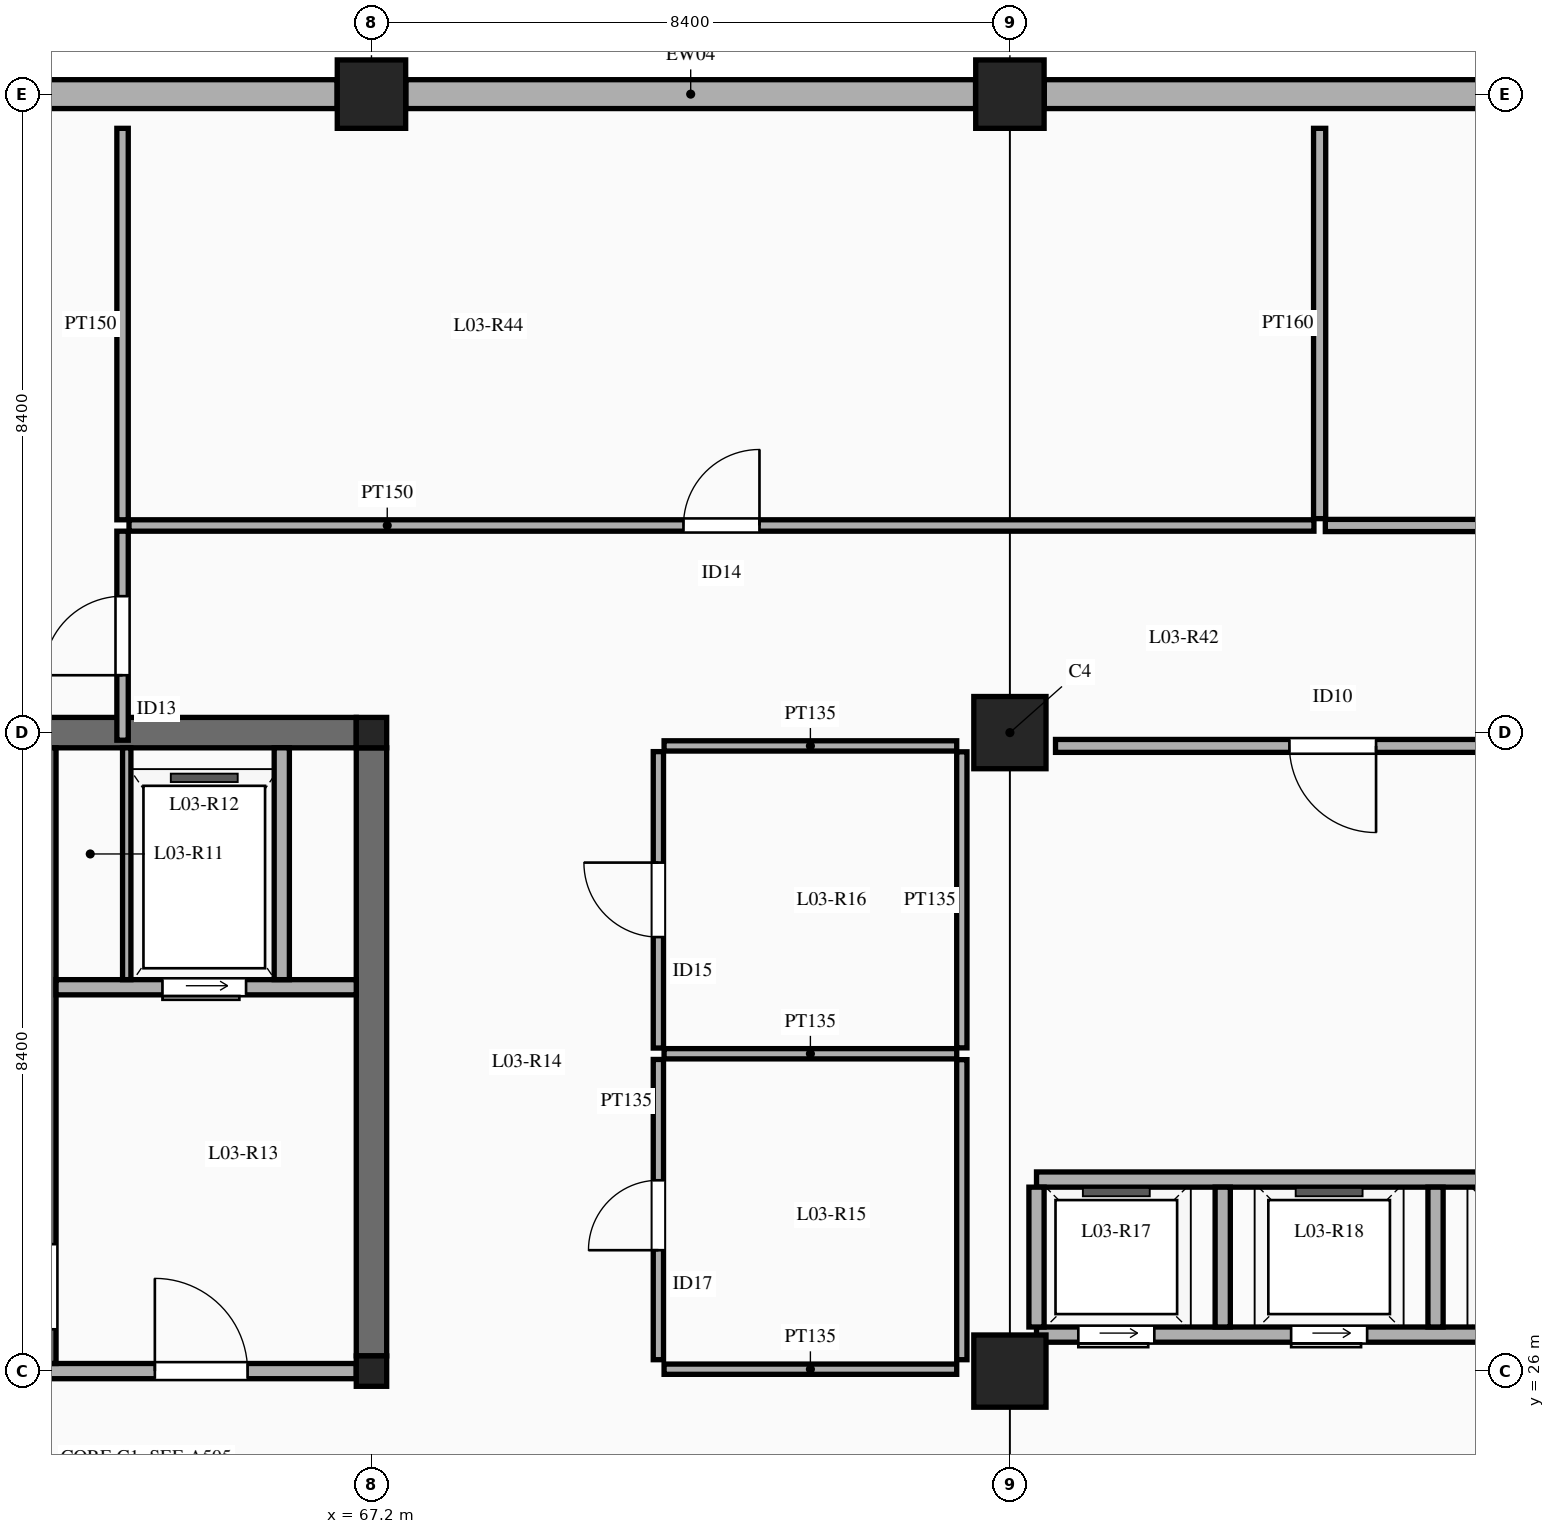
"""IFC4 building model, lengths in metres.
Left out: names, types, materials, properties, quantities, classifications, styles, units other than length and angle.
Written with IfcOpenShell. Run it as: python <this file> out.ifc"""

import sys

from ifc_helpers import new_model, si_unit, direction, frame, frame_2d, origin, origin_2d, place, context, subcontext, project, spatial, rectangle, extrude, element, fill, save


model = new_model("IFC4")
c1 = context("Model", 3, precision=1e-05, world=origin(), true_north=direction((0.0, 1.0)))
c2 = subcontext(c1, "Body", "Model", "MODEL_VIEW")
j1 = project(units=[si_unit("LENGTHUNIT", "METRE"), si_unit("PLANEANGLEUNIT", "RADIAN")], contexts=[c1])
p1 = place(None, origin())
s1 = spatial("IfcSite", under=j1, at=p1, CompositionType="ELEMENT")
p2 = place(p1, origin())
s2 = spatial("IfcBuilding", under=s1, at=p2, CompositionType="ELEMENT")
p3 = place(p2, frame((0.0, 0.0, 15.0)))
s3 = spatial("IfcBuildingStorey", under=s2, at=p3, CompositionType="ELEMENT", Elevation=15.0)
for number, where, z_axis, x_axis in (
    (1, (67.2, 26.0, 0.0), (0.0, 0.0, 1.0), (1.0, 0.0, 0.0)),
    (2, (67.2, 34.4, 0.0), (0.0, 0.0, 1.0), (1.0, 0.0, 0.0)),
):
    element("IfcColumn", number, at=place(p3, frame(where, z_axis=z_axis, x_axis=x_axis)), inside=s3, PredefinedType="COLUMN", context=c2, shape_type="SweptSolid", body=[
        extrude(rectangle(XDim=0.4, YDim=0.4, at=origin_2d()), origin(), (0.0, 0.0, 1.0), 4.5),
    ])
p4 = place(p3, frame((67.2, 42.8, 0.0), z_axis=(0.0, 0.0, 1.0), x_axis=(1.0, 0.0, 0.0)))
e3 = element("IfcColumn", 3, at=p4, inside=s3, PredefinedType="COLUMN", context=c2, shape_type="SweptSolid", body=[
    extrude(rectangle(XDim=0.9, YDim=0.9, at=origin_2d()), origin(), (0.0, 0.0, 1.0), 4.5),
])
for number, where, z_axis, x_axis in (
    (4, (75.6, 26.0, 0.0), (0.0, 0.0, 1.0), (1.0, 0.0, 0.0)),
    (5, (75.6, 34.4, 0.0), (0.0, 0.0, 1.0), (1.0, 0.0, 0.0)),
):
    element("IfcColumn", number, at=place(p3, frame(where, z_axis=z_axis, x_axis=x_axis)), inside=s3, PredefinedType="COLUMN", context=c2, shape_type="SweptSolid", body=[
        extrude(rectangle(XDim=0.95, YDim=0.95, at=origin_2d()), origin(), (0.0, 0.0, 1.0), 4.5),
    ])
p5 = place(p3, frame((75.6, 42.8, 0.0), z_axis=(0.0, 0.0, 1.0), x_axis=(1.0, 0.0, 0.0)))
e6 = element("IfcColumn", 6, at=p5, inside=s3, PredefinedType="COLUMN", context=c2, shape_type="SweptSolid", body=[
    extrude(rectangle(XDim=0.9, YDim=0.9, at=origin_2d()), origin(), (0.0, 0.0, 1.0), 4.5),
])
for number, where, z_axis, x_axis in (
    (7, (67.2, 26.2, 0.0), (0.0, 0.0, 1.0), (0.0, 1.0, 0.0)),
    (8, (59.0, 34.4, 0.0), (0.0, 0.0, 1.0), (1.0, 0.0, 0.0)),
):
    element("IfcWall", number, at=place(p3, frame(where, z_axis=z_axis, x_axis=x_axis)), inside=s3, PredefinedType="SHEAR", context=c2, shape_type="SweptSolid", body=[
        extrude(rectangle(XDim=8.0, YDim=0.4, at=frame_2d((4.0, 0.0))), origin(), (0.0, 0.0, 1.0), 4.5),
    ])
p6 = place(p3, frame((59.252, 42.8, 0.0), z_axis=(0.0, 0.0, 1.0), x_axis=(1.0, 0.0, 0.0)))
e9 = element("IfcWall", 9, at=p6, inside=s3, PredefinedType="SOLIDWALL", context=c2, shape_type="SweptSolid", body=[
    extrude(rectangle(XDim=7.496, YDim=0.38, at=frame_2d((3.748, 0.0))), origin(), (0.0, 0.0, 1.0), 3.55),
])
p7 = place(p3, frame((67.652, 42.8, 0.0), z_axis=(0.0, 0.0, 1.0), x_axis=(1.0, 0.0, 0.0)))
e10 = element("IfcWall", 10, at=p7, inside=s3, PredefinedType="SOLIDWALL", context=c2, shape_type="SweptSolid", body=[
    extrude(rectangle(XDim=7.496, YDim=0.38, at=frame_2d((3.748, 0.0))), origin(), (0.0, 0.0, 1.0), 3.55),
])
p8 = place(p3, frame((76.052, 42.8, 0.0), z_axis=(0.0, 0.0, 1.0), x_axis=(1.0, 0.0, 0.0)))
e11 = element("IfcWall", 11, at=p8, inside=s3, PredefinedType="SOLIDWALL", context=c2, shape_type="SweptSolid", body=[
    extrude(rectangle(XDim=7.496, YDim=0.38, at=frame_2d((3.748, 0.0))), origin(), (0.0, 0.0, 1.0), 3.55),
])
p9 = place(p3, frame((59.0, 26.0, 0.0), z_axis=(0.0, 0.0, 1.0), x_axis=(1.0, 0.0, 0.0)))
e12 = element("IfcWall", 12, at=p9, inside=s3, PredefinedType="SOLIDWALL", context=c2, shape_type="SweptSolid", body=[
    extrude(rectangle(XDim=8.0, YDim=0.2, at=frame_2d((4.0, 0.0))), origin(), (0.0, 0.0, 1.0), 3.48),
])
p10 = place(p9, frame((1.55, 0.0, 0.0)))
e13 = element("IfcOpeningElement", 13, at=p10, cuts=e12, PredefinedType="OPENING", context=c2, shape_type="SweptSolid", body=[
    extrude(rectangle(XDim=1.15, YDim=2.15, at=frame_2d((0.575, 1.075))), frame((0.0, 0.11, 0.0), z_axis=(0.0, -1.0, 0.0), x_axis=(1.0, 0.0, 0.0)), (0.0, 0.0, 1.0), 0.22),
])
p11 = place(p9, frame((5.35, 0.0, 0.0)))
e14 = element("IfcOpeningElement", 14, at=p11, cuts=e12, PredefinedType="OPENING", context=c2, shape_type="SweptSolid", body=[
    extrude(rectangle(XDim=1.22, YDim=2.15, at=frame_2d((0.61, 1.075))), frame((0.0, 0.11, 0.0), z_axis=(0.0, -1.0, 0.0), x_axis=(1.0, 0.0, 0.0)), (0.0, 0.0, 1.0), 0.22),
])
p12 = place(p3, frame((62.95, 26.1, 0.0), z_axis=(0.0, 0.0, 1.0), x_axis=(0.0, 1.0, 0.0)))
e15 = element("IfcWall", 15, at=p12, inside=s3, PredefinedType="SOLIDWALL", context=c2, shape_type="SweptSolid", body=[
    extrude(rectangle(XDim=8.1, YDim=0.2, at=frame_2d((4.05, 0.0))), origin(), (0.0, 0.0, 1.0), 4.25),
])
p13 = place(p12, frame((0.45, 0.0, 0.0)))
e16 = element("IfcOpeningElement", 16, at=p13, cuts=e15, PredefinedType="OPENING", context=c2, shape_type="SweptSolid", body=[
    extrude(rectangle(XDim=1.12, YDim=2.15, at=frame_2d((0.56, 1.075))), frame((0.0, 0.11, 0.0), z_axis=(0.0, -1.0, 0.0), x_axis=(1.0, 0.0, 0.0)), (0.0, 0.0, 1.0), 0.22),
])
p14 = place(p3, frame((63.05, 31.05, 0.0), z_axis=(0.0, 0.0, 1.0), x_axis=(1.0, 0.0, 0.0)))
e17 = element("IfcWall", 17, at=p14, inside=s3, PredefinedType="SOLIDWALL", context=c2, shape_type="SweptSolid", body=[
    extrude(rectangle(XDim=3.95, YDim=0.2, at=frame_2d((1.975, 0.0))), origin(), (0.0, 0.0, 1.0), 4.25),
])
p15 = place(p14, frame((1.4, 0.0, 0.0)))
e18 = element("IfcOpeningElement", 18, at=p15, cuts=e17, PredefinedType="OPENING", context=c2, shape_type="SweptSolid", body=[
    extrude(rectangle(XDim=1.1, YDim=2.15, at=frame_2d((0.55, 1.075))), frame((0.0, 0.11, 0.0), z_axis=(0.0, -1.0, 0.0), x_axis=(1.0, 0.0, 0.0)), (0.0, 0.0, 1.0), 0.22),
])
p16 = place(p3, frame((63.98, 31.15, 0.0), z_axis=(0.0, 0.0, 1.0), x_axis=(0.0, 1.0, 0.0)))
e19 = element("IfcWall", 19, at=p16, inside=s3, PredefinedType="PARTITIONING", context=c2, shape_type="SweptSolid", body=[
    extrude(rectangle(XDim=3.05, YDim=0.11, at=frame_2d((1.525, 0.0))), origin(), (0.0, 0.0, 1.0), 4.25),
])
p17 = place(p3, frame((66.02, 31.15, 0.0), z_axis=(0.0, 0.0, 1.0), x_axis=(0.0, 1.0, 0.0)))
e20 = element("IfcWall", 20, at=p17, inside=s3, PredefinedType="SOLIDWALL", context=c2, shape_type="SweptSolid", body=[
    extrude(rectangle(XDim=3.05, YDim=0.2, at=frame_2d((1.525, 0.0))), origin(), (0.0, 0.0, 1.0), 4.25),
])
p18 = place(p3, frame((75.95, 26.48, 0.0), z_axis=(0.0, 0.0, 1.0), x_axis=(1.0, 0.0, 0.0)))
e21 = element("IfcWall", 21, at=p18, inside=s3, PredefinedType="SOLIDWALL", context=c2, shape_type="SweptSolid", body=[
    extrude(rectangle(XDim=7.77, YDim=0.2, at=frame_2d((3.885, 0.0))), origin(), (0.0, 0.0, 1.0), 3.48),
])
p19 = place(p18, frame((0.55, 0.0, 0.0)))
e22 = element("IfcOpeningElement", 22, at=p19, cuts=e21, PredefinedType="OPENING", context=c2, shape_type="SweptSolid", body=[
    extrude(rectangle(XDim=1.0, YDim=2.15, at=frame_2d((0.5, 1.075))), frame((0.0, 0.11, 0.0), z_axis=(0.0, -1.0, 0.0), x_axis=(1.0, 0.0, 0.0)), (0.0, 0.0, 1.0), 0.22),
])
p20 = place(p18, frame((3.35, 0.0, 0.0)))
e23 = element("IfcOpeningElement", 23, at=p20, cuts=e21, PredefinedType="OPENING", context=c2, shape_type="SweptSolid", body=[
    extrude(rectangle(XDim=1.0, YDim=2.15, at=frame_2d((0.5, 1.075))), frame((0.0, 0.11, 0.0), z_axis=(0.0, -1.0, 0.0), x_axis=(1.0, 0.0, 0.0)), (0.0, 0.0, 1.0), 0.22),
])
p21 = place(p18, frame((6.15, 0.0, 0.0)))
e24 = element("IfcOpeningElement", 24, at=p21, cuts=e21, PredefinedType="OPENING", context=c2, shape_type="SweptSolid", body=[
    extrude(rectangle(XDim=1.0, YDim=2.15, at=frame_2d((0.5, 1.075))), frame((0.0, 0.11, 0.0), z_axis=(0.0, -1.0, 0.0), x_axis=(1.0, 0.0, 0.0)), (0.0, 0.0, 1.0), 0.22),
])
p22 = place(p3, frame((75.95, 28.52, 0.0), z_axis=(0.0, 0.0, 1.0), x_axis=(1.0, 0.0, 0.0)))
e25 = element("IfcWall", 25, at=p22, inside=s3, PredefinedType="SOLIDWALL", context=c2, shape_type="SweptSolid", body=[
    extrude(rectangle(XDim=7.77, YDim=0.2, at=frame_2d((3.885, 0.0))), origin(), (0.0, 0.0, 1.0), 4.25),
])
p23 = place(p3, frame((75.95, 26.58, 0.0), z_axis=(0.0, 0.0, 1.0), x_axis=(0.0, 1.0, 0.0)))
e26 = element("IfcWall", 26, at=p23, inside=s3, PredefinedType="SOLIDWALL", context=c2, shape_type="SweptSolid", body=[
    extrude(rectangle(XDim=1.84, YDim=0.2, at=frame_2d((0.92, 0.0))), origin(), (0.0, 0.0, 1.0), 3.63),
])
for number, where, z_axis, x_axis in (
    (27, (78.4, 26.58, 0.0), (0.0, 0.0, 1.0), (0.0, 1.0, 0.0)),
    (28, (81.2, 26.58, 0.0), (0.0, 0.0, 1.0), (0.0, 1.0, 0.0)),
):
    element("IfcWall", number, at=place(p3, frame(where, z_axis=z_axis, x_axis=x_axis)), inside=s3, PredefinedType="SOLIDWALL", context=c2, shape_type="SweptSolid", body=[
        extrude(rectangle(XDim=1.84, YDim=0.2, at=frame_2d((0.92, 0.0))), origin(), (0.0, 0.0, 1.0), 4.25),
    ])
p24 = place(p3, frame((70.975, 26.15, 0.0), z_axis=(0.0, 0.0, 1.0), x_axis=(0.0, 1.0, 0.0)))
e29 = element("IfcWall", 29, at=p24, inside=s3, PredefinedType="PARTITIONING", context=c2, shape_type="SweptSolid", body=[
    extrude(rectangle(XDim=3.95, YDim=0.135, at=frame_2d((1.975, 0.0))), origin(), (0.0, 0.0, 1.0), 3.45),
])
p25 = place(p24, frame((1.441, 0.0, 0.0)))
e30 = element("IfcOpeningElement", 30, at=p25, cuts=e29, PredefinedType="OPENING", context=c2, shape_type="SweptSolid", body=[
    extrude(rectangle(XDim=0.92, YDim=2.12, at=frame_2d((0.46, 1.06))), frame((0.0, 0.077, 0.0), z_axis=(0.0, -1.0, 0.0), x_axis=(1.0, 0.0, 0.0)), (0.0, 0.0, 1.0), 0.155),
])
p26 = place(p3, frame((70.975, 30.25, 0.0), z_axis=(0.0, 0.0, 1.0), x_axis=(0.0, 1.0, 0.0)))
e31 = element("IfcWall", 31, at=p26, inside=s3, PredefinedType="PARTITIONING", context=c2, shape_type="SweptSolid", body=[
    extrude(rectangle(XDim=3.9, YDim=0.135, at=frame_2d((1.95, 0.0))), origin(), (0.0, 0.0, 1.0), 3.45),
])
p27 = place(p26, frame((1.46, 0.0, 0.0)))
e32 = element("IfcOpeningElement", 32, at=p27, cuts=e31, PredefinedType="OPENING", context=c2, shape_type="SweptSolid", body=[
    extrude(rectangle(XDim=0.98, YDim=2.15, at=frame_2d((0.49, 1.075))), frame((0.0, 0.077, 0.0), z_axis=(0.0, -1.0, 0.0), x_axis=(1.0, 0.0, 0.0)), (0.0, 0.0, 1.0), 0.155),
])
for number, where, z_axis, x_axis in (
    (33, (71.05, 30.175, 0.0), (0.0, 0.0, 1.0), (1.0, 0.0, 0.0)),
    (34, (71.05, 26.025, 0.0), (0.0, 0.0, 1.0), (1.0, 0.0, 0.0)),
    (35, (71.05, 34.225, 0.0), (0.0, 0.0, 1.0), (1.0, 0.0, 0.0)),
):
    element("IfcWall", number, at=place(p3, frame(where, z_axis=z_axis, x_axis=x_axis)), inside=s3, PredefinedType="PARTITIONING", context=c2, shape_type="SweptSolid", body=[
        extrude(rectangle(XDim=3.85, YDim=0.135, at=frame_2d((1.925, 0.0))), origin(), (0.0, 0.0, 1.0), 3.45),
    ])
p28 = place(p3, frame((76.2, 34.225, 0.0), z_axis=(0.0, 0.0, 1.0), x_axis=(1.0, 0.0, 0.0)))
e36 = element("IfcWall", 36, at=p28, inside=s3, PredefinedType="PARTITIONING", context=c2, shape_type="SweptSolid", body=[
    extrude(rectangle(XDim=7.295, YDim=0.17, at=frame_2d((3.647, 0.0))), origin(), (0.0, 0.0, 1.0), 3.45),
])
p29 = place(p28, frame((3.077, 0.0, 0.0)))
e37 = element("IfcOpeningElement", 37, at=p29, cuts=e36, PredefinedType="OPENING", context=c2, shape_type="SweptSolid", body=[
    extrude(rectangle(XDim=1.14, YDim=2.22, at=frame_2d((0.57, 1.11))), frame((0.0, 0.095, 0.0), z_axis=(0.0, -1.0, 0.0), x_axis=(1.0, 0.0, 0.0)), (0.0, 0.0, 1.0), 0.19),
])
p30 = place(p3, frame((63.925, 34.3, 0.0), z_axis=(0.0, 0.0, 1.0), x_axis=(0.0, 1.0, 0.0)))
e38 = element("IfcWall", 38, at=p30, inside=s3, PredefinedType="PARTITIONING", context=c2, shape_type="SweptSolid", body=[
    extrude(rectangle(XDim=2.75, YDim=0.15, at=frame_2d((1.375, 0.0))), origin(), (0.0, 0.0, 1.0), 3.45),
])
p31 = place(p30, frame((0.855, 0.0, 0.0)))
e39 = element("IfcOpeningElement", 39, at=p31, cuts=e38, PredefinedType="OPENING", context=c2, shape_type="SweptSolid", body=[
    extrude(rectangle(XDim=1.04, YDim=2.15, at=frame_2d((0.52, 1.075))), frame((0.0, 0.085, 0.0), z_axis=(0.0, -1.0, 0.0), x_axis=(1.0, 0.0, 0.0)), (0.0, 0.0, 1.0), 0.17),
])
p32 = place(p3, frame((64.01, 37.125, 0.0), z_axis=(0.0, 0.0, 1.0), x_axis=(1.0, 0.0, 0.0)))
e40 = element("IfcWall", 40, at=p32, inside=s3, PredefinedType="PARTITIONING", context=c2, shape_type="SweptSolid", body=[
    extrude(rectangle(XDim=15.59, YDim=0.15, at=frame_2d((7.795, 0.0))), origin(), (0.0, 0.0, 1.0), 3.45),
])
p33 = place(p32, frame((7.295, 0.0, 0.0)))
e41 = element("IfcOpeningElement", 41, at=p33, cuts=e40, PredefinedType="OPENING", context=c2, shape_type="SweptSolid", body=[
    extrude(rectangle(XDim=1.0, YDim=2.15, at=frame_2d((0.5, 1.075))), frame((0.0, 0.085, 0.0), z_axis=(0.0, -1.0, 0.0), x_axis=(1.0, 0.0, 0.0)), (0.0, 0.0, 1.0), 0.17),
])
p34 = place(p3, frame((79.75, 37.125, 0.0), z_axis=(0.0, 0.0, 1.0), x_axis=(1.0, 0.0, 0.0)))
e42 = element("IfcWall", 42, at=p34, inside=s3, PredefinedType="PARTITIONING", context=c2, shape_type="SweptSolid", body=[
    extrude(rectangle(XDim=15.65, YDim=0.16, at=frame_2d((7.825, 0.0))), origin(), (0.0, 0.0, 1.0), 3.45),
])
p35 = place(p34, frame((7.18, 0.0, 0.0)))
e43 = element("IfcOpeningElement", 43, at=p35, cuts=e42, PredefinedType="OPENING", context=c2, shape_type="SweptSolid", body=[
    extrude(rectangle(XDim=1.14, YDim=2.22, at=frame_2d((0.57, 1.11))), frame((0.0, 0.09, 0.0), z_axis=(0.0, -1.0, 0.0), x_axis=(1.0, 0.0, 0.0)), (0.0, 0.0, 1.0), 0.18),
])
p36 = place(p3, frame((63.925, 37.2, 0.0), z_axis=(0.0, 0.0, 1.0), x_axis=(0.0, 1.0, 0.0)))
e44 = element("IfcWall", 44, at=p36, inside=s3, PredefinedType="PARTITIONING", context=c2, shape_type="SweptSolid", body=[
    extrude(rectangle(XDim=5.15, YDim=0.15, at=frame_2d((2.575, 0.0))), origin(), (0.0, 0.0, 1.0), 3.45),
])
p37 = place(p3, frame((79.675, 37.215, 0.0), z_axis=(0.0, 0.0, 1.0), x_axis=(0.0, 1.0, 0.0)))
e45 = element("IfcWall", 45, at=p37, inside=s3, PredefinedType="PARTITIONING", context=c2, shape_type="SweptSolid", body=[
    extrude(rectangle(XDim=5.135, YDim=0.16, at=frame_2d((2.567, 0.0))), origin(), (0.0, 0.0, 1.0), 3.45),
])
p38 = place(p3, frame((74.968, 26.15, 0.0), z_axis=(0.0, 0.0, 1.0), x_axis=(0.0, 1.0, 0.0)))
e46 = element("IfcWall", 46, at=p38, inside=s3, PredefinedType="PARTITIONING", context=c2, shape_type="SweptSolid", body=[
    extrude(rectangle(XDim=3.948, YDim=0.135, at=frame_2d((1.974, 0.0))), origin(), (0.0, 0.0, 1.0), 3.45),
])
p39 = place(p3, frame((74.968, 30.252, 0.0), z_axis=(0.0, 0.0, 1.0), x_axis=(0.0, 1.0, 0.0)))
e47 = element("IfcWall", 47, at=p39, inside=s3, PredefinedType="PARTITIONING", context=c2, shape_type="SweptSolid", body=[
    extrude(rectangle(XDim=3.895, YDim=0.135, at=frame_2d((1.948, 0.0))), origin(), (0.0, 0.0, 1.0), 3.45),
])
p40 = place(p11, origin())
e48 = element("IfcDoor", 48, at=p40, inside=s3, OperationType="SINGLE_SWING_LEFT", PredefinedType="DOOR", context=c2, shape_type="SweptSolid", body=[
    extrude(rectangle(XDim=1.22, YDim=2.15, at=frame_2d((0.61, 1.075))), frame((0.0, 0.025, 0.0), z_axis=(0.0, -1.0, 0.0), x_axis=(1.0, 0.0, 0.0)), (0.0, 0.0, 1.0), 0.05),
])
fill(e14, e48)
p41 = place(p15, frame((1.1, 0.0, 0.0), z_axis=(0.0, 0.0, 1.0), x_axis=(-1.0, 0.0, 0.0)))
e49 = element("IfcDoor", 49, at=p41, inside=s3, OperationType="SLIDING_TO_LEFT", PredefinedType="DOOR", context=c2, shape_type="SweptSolid", body=[
    extrude(rectangle(XDim=1.1, YDim=2.15, at=frame_2d((0.55, 1.075))), frame((0.0, 0.025, 0.0), z_axis=(0.0, -1.0, 0.0), x_axis=(1.0, 0.0, 0.0)), (0.0, 0.0, 1.0), 0.05),
])
fill(e18, e49)
p42 = place(p19, frame((1.0, 0.0, 0.0), z_axis=(0.0, 0.0, 1.0), x_axis=(-1.0, 0.0, 0.0)))
e50 = element("IfcDoor", 50, at=p42, inside=s3, OperationType="SLIDING_TO_LEFT", PredefinedType="DOOR", context=c2, shape_type="SweptSolid", body=[
    extrude(rectangle(XDim=1.0, YDim=2.15, at=frame_2d((0.5, 1.075))), frame((0.0, 0.025, 0.0), z_axis=(0.0, -1.0, 0.0), x_axis=(1.0, 0.0, 0.0)), (0.0, 0.0, 1.0), 0.05),
])
fill(e22, e50)
p43 = place(p20, frame((1.0, 0.0, 0.0), z_axis=(0.0, 0.0, 1.0), x_axis=(-1.0, 0.0, 0.0)))
e51 = element("IfcDoor", 51, at=p43, inside=s3, OperationType="SLIDING_TO_LEFT", PredefinedType="DOOR", context=c2, shape_type="SweptSolid", body=[
    extrude(rectangle(XDim=1.0, YDim=2.15, at=frame_2d((0.5, 1.075))), frame((0.0, 0.025, 0.0), z_axis=(0.0, -1.0, 0.0), x_axis=(1.0, 0.0, 0.0)), (0.0, 0.0, 1.0), 0.05),
])
fill(e23, e51)
p44 = place(p25, origin())
e52 = element("IfcDoor", 52, at=p44, inside=s3, OperationType="SINGLE_SWING_LEFT", PredefinedType="DOOR", context=c2, shape_type="SweptSolid", body=[
    extrude(rectangle(XDim=0.92, YDim=2.12, at=frame_2d((0.46, 1.06))), frame((0.0, 0.025, 0.0), z_axis=(0.0, -1.0, 0.0), x_axis=(1.0, 0.0, 0.0)), (0.0, 0.0, 1.0), 0.05),
])
fill(e30, e52)
p45 = place(p27, origin())
e53 = element("IfcDoor", 53, at=p45, inside=s3, OperationType="SINGLE_SWING_RIGHT", PredefinedType="DOOR", context=c2, shape_type="SweptSolid", body=[
    extrude(rectangle(XDim=0.98, YDim=2.15, at=frame_2d((0.49, 1.075))), frame((0.0, 0.025, 0.0), z_axis=(0.0, -1.0, 0.0), x_axis=(1.0, 0.0, 0.0)), (0.0, 0.0, 1.0), 0.05),
])
fill(e32, e53)
p46 = place(p29, frame((1.14, 0.0, 0.0), z_axis=(0.0, 0.0, 1.0), x_axis=(-1.0, 0.0, 0.0)))
e54 = element("IfcDoor", 54, at=p46, inside=s3, OperationType="SINGLE_SWING_LEFT", PredefinedType="DOOR", context=c2, shape_type="SweptSolid", body=[
    extrude(rectangle(XDim=1.14, YDim=2.22, at=frame_2d((0.57, 1.11))), frame((0.0, 0.025, 0.0), z_axis=(0.0, -1.0, 0.0), x_axis=(1.0, 0.0, 0.0)), (0.0, 0.0, 1.0), 0.05),
])
fill(e37, e54)
p47 = place(p31, origin())
e55 = element("IfcDoor", 55, at=p47, inside=s3, OperationType="SINGLE_SWING_LEFT", PredefinedType="DOOR", context=c2, shape_type="SweptSolid", body=[
    extrude(rectangle(XDim=1.04, YDim=2.15, at=frame_2d((0.52, 1.075))), frame((0.0, 0.025, 0.0), z_axis=(0.0, -1.0, 0.0), x_axis=(1.0, 0.0, 0.0)), (0.0, 0.0, 1.0), 0.05),
])
fill(e39, e55)
p48 = place(p33, origin())
e56 = element("IfcDoor", 56, at=p48, inside=s3, OperationType="SINGLE_SWING_RIGHT", PredefinedType="DOOR", context=c2, shape_type="SweptSolid", body=[
    extrude(rectangle(XDim=1.0, YDim=2.15, at=frame_2d((0.5, 1.075))), frame((0.0, 0.025, 0.0), z_axis=(0.0, -1.0, 0.0), x_axis=(1.0, 0.0, 0.0)), (0.0, 0.0, 1.0), 0.05),
])
fill(e41, e56)
save(model, sys.argv[1])
